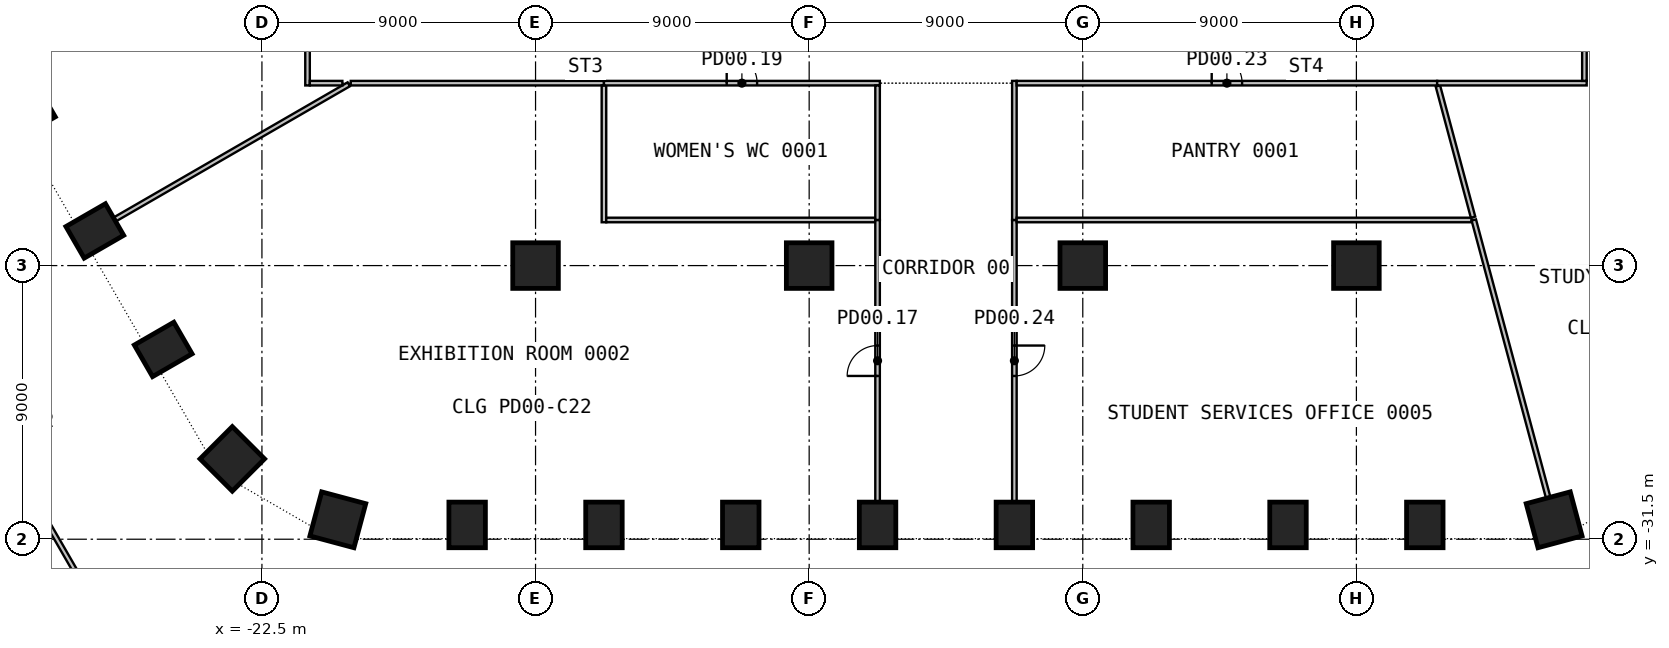
"""IFC4 building model, lengths in metres.
Left out: names, types, materials, properties, quantities, classifications, styles, units other than length and angle.
Written with IfcOpenShell. Run it as: python <this file> out.ifc"""

import sys

from ifc_helpers import new_model, si_unit, direction, frame, frame_2d, origin, origin_2d, place, context, subcontext, project, spatial, rectangle, circle, extrude, element, fill, save


model = new_model("IFC4")
c1 = context("Model", 3, precision=1e-05, world=origin(), true_north=direction((0.0, 1.0)))
c2 = subcontext(c1, "Body", "Model", "MODEL_VIEW")
j1 = project(units=[si_unit("LENGTHUNIT", "METRE"), si_unit("PLANEANGLEUNIT", "RADIAN")], contexts=[c1])
p1 = place(None, origin())
s1 = spatial("IfcSite", under=j1, at=p1, CompositionType="ELEMENT")
p2 = place(p1, origin())
s2 = spatial("IfcBuilding", under=s1, at=p2, CompositionType="ELEMENT")
p3 = place(p2, origin())
s3 = spatial("IfcBuildingStorey", under=s2, at=p3, CompositionType="ELEMENT", Elevation=0.0)
p4 = place(p3, frame((-20.004, -30.861, 0.0), z_axis=(0.0, 0.0, 1.0), x_axis=(0.965925826289, -0.258819045103, 0.0)))
e1 = element("IfcColumn", 1, at=p4, inside=s3, PredefinedType="COLUMN", context=c2, shape_type="SweptSolid", body=[
    extrude(rectangle(XDim=1.5, YDim=1.5, at=origin_2d()), origin(), (0.0, 0.0, 1.0), 5.6),
])
for number, where, z_axis, x_axis in (
    (2, (-15.75, -31.03, 0.0), (0.0, 0.0, 1.0), (1.0, 0.0, 0.0)),
    (3, (-11.25, -31.03, 0.0), (0.0, 0.0, 1.0), (1.0, 0.0, 0.0)),
    (4, (-6.75, -31.03, 0.0), (0.0, 0.0, 1.0), (1.0, 0.0, 0.0)),
    (5, (-2.25, -31.03, 0.0), (0.0, 0.0, 1.0), (1.0, 0.0, 0.0)),
    (6, (2.25, -31.03, 0.0), (0.0, 0.0, 1.0), (1.0, 0.0, 0.0)),
    (7, (6.75, -31.03, 0.0), (0.0, 0.0, 1.0), (1.0, 0.0, 0.0)),
    (8, (11.25, -31.03, 0.0), (0.0, 0.0, 1.0), (1.0, 0.0, 0.0)),
    (9, (15.75, -31.03, 0.0), (0.0, 0.0, 1.0), (1.0, 0.0, 0.0)),
):
    element("IfcColumn", number, at=place(p3, frame(where, z_axis=z_axis, x_axis=x_axis)), inside=s3, PredefinedType="COLUMN", context=c2, shape_type="SweptSolid", body=[
        extrude(rectangle(XDim=1.2, YDim=1.5, at=origin_2d()), origin(), (0.0, 0.0, 1.0), 5.6),
    ])
p5 = place(p3, frame((20.004, -30.861, 0.0), z_axis=(0.0, 0.0, 1.0), x_axis=(0.965925826289, 0.258819045103, 0.0)))
e10 = element("IfcColumn", 10, at=p5, inside=s3, PredefinedType="COLUMN", context=c2, shape_type="SweptSolid", body=[
    extrude(rectangle(XDim=1.5, YDim=1.5, at=origin_2d()), origin(), (0.0, 0.0, 1.0), 5.6),
])
for number, where, z_axis, x_axis in (
    (11, (-30.248, -17.463, 0.0), (0.0, 0.0, 1.0), (0.5, -0.866, 0.0)),
    (12, (-27.998, -21.361, 0.0), (0.0, 0.0, 1.0), (0.5, -0.866, 0.0)),
    (13, (-25.748, -25.258, 0.0), (0.0, 0.0, 1.0), (0.5, -0.866, 0.0)),
):
    element("IfcColumn", number, at=place(p3, frame(where, z_axis=z_axis, x_axis=x_axis)), inside=s3, PredefinedType="COLUMN", context=c2, shape_type="SweptSolid", body=[
        extrude(rectangle(XDim=1.2, YDim=1.5, at=origin_2d()), origin(), (0.0, 0.0, 1.0), 5.6),
    ])
p6 = place(p3, frame((-23.475, -28.857, 0.0), z_axis=(0.0, 0.0, 1.0), x_axis=(0.707106781187, -0.707106781187, 0.0)))
e14 = element("IfcColumn", 14, at=p6, inside=s3, PredefinedType="COLUMN", context=c2, shape_type="SweptSolid", body=[
    extrude(rectangle(XDim=1.5, YDim=1.5, at=origin_2d()), origin(), (0.0, 0.0, 1.0), 5.6),
])
for number, where, z_axis, x_axis in (
    (15, (-13.5, -22.5, 0.0), (0.0, 0.0, 1.0), (1.0, 0.0, 0.0)),
    (16, (-4.5, -22.5, 0.0), (0.0, 0.0, 1.0), (1.0, 0.0, 0.0)),
    (17, (4.5, -22.5, 0.0), (0.0, 0.0, 1.0), (1.0, 0.0, 0.0)),
    (18, (13.5, -22.5, 0.0), (0.0, 0.0, 1.0), (1.0, 0.0, 0.0)),
):
    element("IfcColumn", number, at=place(p3, frame(where, z_axis=z_axis, x_axis=x_axis)), inside=s3, PredefinedType="COLUMN", context=c2, shape_type="SweptSolid", body=[
        extrude(circle(Radius=0.75, at=origin_2d()), origin(), (0.0, 0.0, 1.0), 5.6),
    ])
p7 = place(p3, frame((-28.062, -33.548, 0.0), z_axis=(0.0, 0.0, 1.0), x_axis=(-0.500064997195, 0.865987874384, 0.0)))
e19 = element("IfcWall", 19, at=p7, inside=s3, PredefinedType="PARTITIONING", context=c2, shape_type="SweptSolid", body=[
    extrude(rectangle(XDim=10.447, YDim=0.15, at=frame_2d((5.223, 0.0))), origin(), (0.0, 0.0, 1.0), 6.0),
])
p8 = place(p7, frame((4.723, 0.0, 0.0)))
e20 = element("IfcOpeningElement", 20, at=p8, cuts=e19, PredefinedType="OPENING", context=c2, shape_type="SweptSolid", body=[
    extrude(rectangle(XDim=1.0, YDim=2.1, at=frame_2d((0.5, 1.05))), frame((0.0, 0.085, 0.0), z_axis=(0.0, -1.0, 0.0), x_axis=(1.0, 0.0, 0.0)), (0.0, 0.0, 1.0), 0.17),
])
p9 = place(p3, frame((-19.644, -16.538, 0.0), z_axis=(0.0, 0.0, 1.0), x_axis=(-0.866000072607, -0.50004387232, 0.0)))
e21 = element("IfcWall", 21, at=p9, inside=s3, PredefinedType="PARTITIONING", context=c2, shape_type="SweptSolid", body=[
    extrude(rectangle(XDim=8.876, YDim=0.15, at=frame_2d((4.438, 0.0))), origin(), (0.0, 0.0, 1.0), 5.6),
])
p10 = place(p3, frame((-21.0, -2.325, 0.0), z_axis=(0.0, 0.0, 1.0), x_axis=(0.0, -1.0, 0.0)))
e22 = element("IfcWall", 22, at=p10, inside=s3, PredefinedType="PARTITIONING", context=c2, shape_type="SweptSolid", body=[
    extrude(rectangle(XDim=14.25, YDim=0.15, at=frame_2d((7.125, 0.0))), origin(), (0.0, 0.0, 1.0), 5.6),
])
p11 = place(p10, frame((6.625, 0.0, 0.0)))
e23 = element("IfcOpeningElement", 23, at=p11, cuts=e22, PredefinedType="OPENING", context=c2, shape_type="SweptSolid", body=[
    extrude(rectangle(XDim=1.0, YDim=2.1, at=frame_2d((0.5, 1.05))), frame((0.0, 0.085, 0.0), z_axis=(0.0, -1.0, 0.0), x_axis=(1.0, 0.0, 0.0)), (0.0, 0.0, 1.0), 0.17),
])
p12 = place(p3, frame((-20.925, -16.5, 0.0), z_axis=(0.0, 0.0, 1.0), x_axis=(1.0, 0.0, 0.0)))
e24 = element("IfcWall", 24, at=p12, inside=s3, PredefinedType="PARTITIONING", context=c2, shape_type="SweptSolid", body=[
    extrude(rectangle(XDim=1.071, YDim=0.15, at=frame_2d((0.536, 0.0))), origin(), (0.0, 0.0, 1.0), 5.6),
])
p13 = place(p3, frame((-19.579, -16.5, 0.0), z_axis=(0.0, 0.0, 1.0), x_axis=(1.0, 0.0, 0.0)))
e25 = element("IfcWall", 25, at=p13, inside=s3, PredefinedType="PARTITIONING", context=c2, shape_type="SweptSolid", body=[
    extrude(rectangle(XDim=8.329, YDim=0.15, at=frame_2d((4.165, 0.0))), origin(), (0.0, 0.0, 1.0), 5.6),
])
p14 = place(p3, frame((-11.25, -16.575, 0.0), z_axis=(0.0, 0.0, 1.0), x_axis=(0.0, -1.0, 0.0)))
e26 = element("IfcWall", 26, at=p14, inside=s3, PredefinedType="PARTITIONING", context=c2, shape_type="SweptSolid", body=[
    extrude(rectangle(XDim=4.5, YDim=0.15, at=frame_2d((2.25, 0.0))), origin(), (0.0, 0.0, 1.0), 5.6),
])
p15 = place(p3, frame((-11.175, -21.0, 0.0), z_axis=(0.0, 0.0, 1.0), x_axis=(1.0, 0.0, 0.0)))
e27 = element("IfcWall", 27, at=p15, inside=s3, PredefinedType="PARTITIONING", context=c2, shape_type="SweptSolid", body=[
    extrude(rectangle(XDim=8.85, YDim=0.15, at=frame_2d((4.425, 0.0))), origin(), (0.0, 0.0, 1.0), 5.6),
])
p16 = place(p3, frame((-11.25, -16.5, 0.0), z_axis=(0.0, 0.0, 1.0), x_axis=(1.0, 0.0, 0.0)))
e28 = element("IfcWall", 28, at=p16, inside=s3, PredefinedType="PARTITIONING", context=c2, shape_type="SweptSolid", body=[
    extrude(rectangle(XDim=9.075, YDim=0.15, at=frame_2d((4.538, 0.0))), origin(), (0.0, 0.0, 1.0), 5.6),
])
p17 = place(p16, frame((4.038, 0.0, 0.0)))
e29 = element("IfcOpeningElement", 29, at=p17, cuts=e28, PredefinedType="OPENING", context=c2, shape_type="SweptSolid", body=[
    extrude(rectangle(XDim=1.0, YDim=2.1, at=frame_2d((0.5, 1.05))), frame((0.0, 0.085, 0.0), z_axis=(0.0, -1.0, 0.0), x_axis=(1.0, 0.0, 0.0)), (0.0, 0.0, 1.0), 0.17),
])
p18 = place(p3, frame((-2.25, -30.26, 0.0), z_axis=(0.0, 0.0, 1.0), x_axis=(0.0, 1.0, 0.0)))
e30 = element("IfcWall", 30, at=p18, inside=s3, PredefinedType="PARTITIONING", context=c2, shape_type="SweptSolid", body=[
    extrude(rectangle(XDim=9.26, YDim=0.15, at=frame_2d((4.63, 0.0))), origin(), (0.0, 0.0, 1.0), 5.6),
])
p19 = place(p18, frame((4.13, 0.0, 0.0)))
e31 = element("IfcOpeningElement", 31, at=p19, cuts=e30, PredefinedType="OPENING", context=c2, shape_type="SweptSolid", body=[
    extrude(rectangle(XDim=1.0, YDim=2.1, at=frame_2d((0.5, 1.05))), frame((0.0, 0.085, 0.0), z_axis=(0.0, -1.0, 0.0), x_axis=(1.0, 0.0, 0.0)), (0.0, 0.0, 1.0), 0.17),
])
p20 = place(p3, frame((-2.25, -21.0, 0.0), z_axis=(0.0, 0.0, 1.0), x_axis=(0.0, 1.0, 0.0)))
e32 = element("IfcWall", 32, at=p20, inside=s3, PredefinedType="PARTITIONING", context=c2, shape_type="SweptSolid", body=[
    extrude(rectangle(XDim=4.425, YDim=0.15, at=frame_2d((2.212, 0.0))), origin(), (0.0, 0.0, 1.0), 5.6),
])
p21 = place(p3, frame((2.25, -21.0, 0.0), z_axis=(0.0, 0.0, 1.0), x_axis=(0.0, -1.0, 0.0)))
e33 = element("IfcWall", 33, at=p21, inside=s3, PredefinedType="PARTITIONING", context=c2, shape_type="SweptSolid", body=[
    extrude(rectangle(XDim=9.26, YDim=0.15, at=frame_2d((4.63, 0.0))), origin(), (0.0, 0.0, 1.0), 5.6),
])
p22 = place(p21, frame((4.13, 0.0, 0.0)))
e34 = element("IfcOpeningElement", 34, at=p22, cuts=e33, PredefinedType="OPENING", context=c2, shape_type="SweptSolid", body=[
    extrude(rectangle(XDim=1.0, YDim=2.1, at=frame_2d((0.5, 1.05))), frame((0.0, 0.085, 0.0), z_axis=(0.0, -1.0, 0.0), x_axis=(1.0, 0.0, 0.0)), (0.0, 0.0, 1.0), 0.17),
])
p23 = place(p3, frame((2.25, -16.425, 0.0), z_axis=(0.0, 0.0, 1.0), x_axis=(0.0, -1.0, 0.0)))
e35 = element("IfcWall", 35, at=p23, inside=s3, PredefinedType="PARTITIONING", context=c2, shape_type="SweptSolid", body=[
    extrude(rectangle(XDim=4.575, YDim=0.15, at=frame_2d((2.288, 0.0))), origin(), (0.0, 0.0, 1.0), 5.6),
])
p24 = place(p3, frame((17.287, -21.0, 0.0), z_axis=(0.0, 0.0, 1.0), x_axis=(-1.0, 0.0, 0.0)))
e36 = element("IfcWall", 36, at=p24, inside=s3, PredefinedType="PARTITIONING", context=c2, shape_type="SweptSolid", body=[
    extrude(rectangle(XDim=14.962, YDim=0.15, at=frame_2d((7.481, 0.0))), origin(), (0.0, 0.0, 1.0), 5.6),
])
p25 = place(p3, frame((2.325, -16.5, 0.0), z_axis=(0.0, 0.0, 1.0), x_axis=(1.0, 0.0, 0.0)))
e37 = element("IfcWall", 37, at=p25, inside=s3, PredefinedType="PARTITIONING", context=c2, shape_type="SweptSolid", body=[
    extrude(rectangle(XDim=13.831, YDim=0.15, at=frame_2d((6.916, 0.0))), origin(), (0.0, 0.0, 1.0), 5.6),
])
p26 = place(p25, frame((6.416, 0.0, 0.0)))
e38 = element("IfcOpeningElement", 38, at=p26, cuts=e37, PredefinedType="OPENING", context=c2, shape_type="SweptSolid", body=[
    extrude(rectangle(XDim=1.0, YDim=2.1, at=frame_2d((0.5, 1.05))), frame((0.0, 0.085, 0.0), z_axis=(0.0, -1.0, 0.0), x_axis=(1.0, 0.0, 0.0)), (0.0, 0.0, 1.0), 0.17),
])
p27 = place(p3, frame((16.181, -16.592, 0.0), z_axis=(0.0, 0.0, 1.0), x_axis=(0.258852599715, -0.965916834733, 0.0)))
e39 = element("IfcWall", 39, at=p27, inside=s3, PredefinedType="PARTITIONING", context=c2, shape_type="SweptSolid", body=[
    extrude(rectangle(XDim=4.469, YDim=0.15, at=frame_2d((2.234, 0.0))), origin(), (0.0, 0.0, 1.0), 5.6),
])
p28 = place(p3, frame((16.156, -16.5, 0.0), z_axis=(0.0, 0.0, 1.0), x_axis=(1.0, 0.0, 0.0)))
e40 = element("IfcWall", 40, at=p28, inside=s3, PredefinedType="PARTITIONING", context=c2, shape_type="SweptSolid", body=[
    extrude(rectangle(XDim=4.919, YDim=0.15, at=frame_2d((2.459, 0.0))), origin(), (0.0, 0.0, 1.0), 5.6),
])
p29 = place(p3, frame((17.362, -21.0, 0.0), z_axis=(0.0, 0.0, 1.0), x_axis=(0.258805468398, -0.965929464054, 0.0)))
e41 = element("IfcWall", 41, at=p29, inside=s3, PredefinedType="PARTITIONING", context=c2, shape_type="SweptSolid", body=[
    extrude(rectangle(XDim=9.439, YDim=0.15, at=frame_2d((4.719, 0.0))), origin(), (0.0, 0.0, 1.0), 5.6),
])
p30 = place(p3, frame((21.0, -16.425, 0.0), z_axis=(0.0, 0.0, 1.0), x_axis=(0.0, 1.0, 0.0)))
e42 = element("IfcWall", 42, at=p30, inside=s3, PredefinedType="PARTITIONING", context=c2, shape_type="SweptSolid", body=[
    extrude(rectangle(XDim=14.25, YDim=0.15, at=frame_2d((7.125, 0.0))), origin(), (0.0, 0.0, 1.0), 5.6),
])
p31 = place(p30, frame((6.625, 0.0, 0.0)))
e43 = element("IfcOpeningElement", 43, at=p31, cuts=e42, PredefinedType="OPENING", context=c2, shape_type="SweptSolid", body=[
    extrude(rectangle(XDim=1.0, YDim=2.1, at=frame_2d((0.5, 1.05))), frame((0.0, 0.085, 0.0), z_axis=(0.0, -1.0, 0.0), x_axis=(1.0, 0.0, 0.0)), (0.0, 0.0, 1.0), 0.17),
])
p32 = place(p19, origin())
e44 = element("IfcDoor", 44, at=p32, inside=s3, OperationType="SINGLE_SWING_RIGHT", PredefinedType="DOOR", context=c2, shape_type="SweptSolid", body=[
    extrude(rectangle(XDim=1.0, YDim=2.1, at=frame_2d((0.5, 1.05))), frame((0.0, 0.025, 0.0), z_axis=(0.0, -1.0, 0.0), x_axis=(1.0, 0.0, 0.0)), (0.0, 0.0, 1.0), 0.05),
])
fill(e31, e44)
p33 = place(p17, origin())
e45 = element("IfcDoor", 45, at=p33, inside=s3, OperationType="SINGLE_SWING_RIGHT", PredefinedType="DOOR", context=c2, shape_type="SweptSolid", body=[
    extrude(rectangle(XDim=1.0, YDim=2.1, at=frame_2d((0.5, 1.05))), frame((0.0, 0.025, 0.0), z_axis=(0.0, -1.0, 0.0), x_axis=(1.0, 0.0, 0.0)), (0.0, 0.0, 1.0), 0.05),
])
fill(e29, e45)
p34 = place(p26, origin())
e46 = element("IfcDoor", 46, at=p34, inside=s3, OperationType="SINGLE_SWING_LEFT", PredefinedType="DOOR", context=c2, shape_type="SweptSolid", body=[
    extrude(rectangle(XDim=1.0, YDim=2.1, at=frame_2d((0.5, 1.05))), frame((0.0, 0.025, 0.0), z_axis=(0.0, -1.0, 0.0), x_axis=(1.0, 0.0, 0.0)), (0.0, 0.0, 1.0), 0.05),
])
fill(e38, e46)
p35 = place(p22, origin())
e47 = element("IfcDoor", 47, at=p35, inside=s3, OperationType="SINGLE_SWING_RIGHT", PredefinedType="DOOR", context=c2, shape_type="SweptSolid", body=[
    extrude(rectangle(XDim=1.0, YDim=2.1, at=frame_2d((0.5, 1.05))), frame((0.0, 0.025, 0.0), z_axis=(0.0, -1.0, 0.0), x_axis=(1.0, 0.0, 0.0)), (0.0, 0.0, 1.0), 0.05),
])
fill(e34, e47)
save(model, sys.argv[1])
